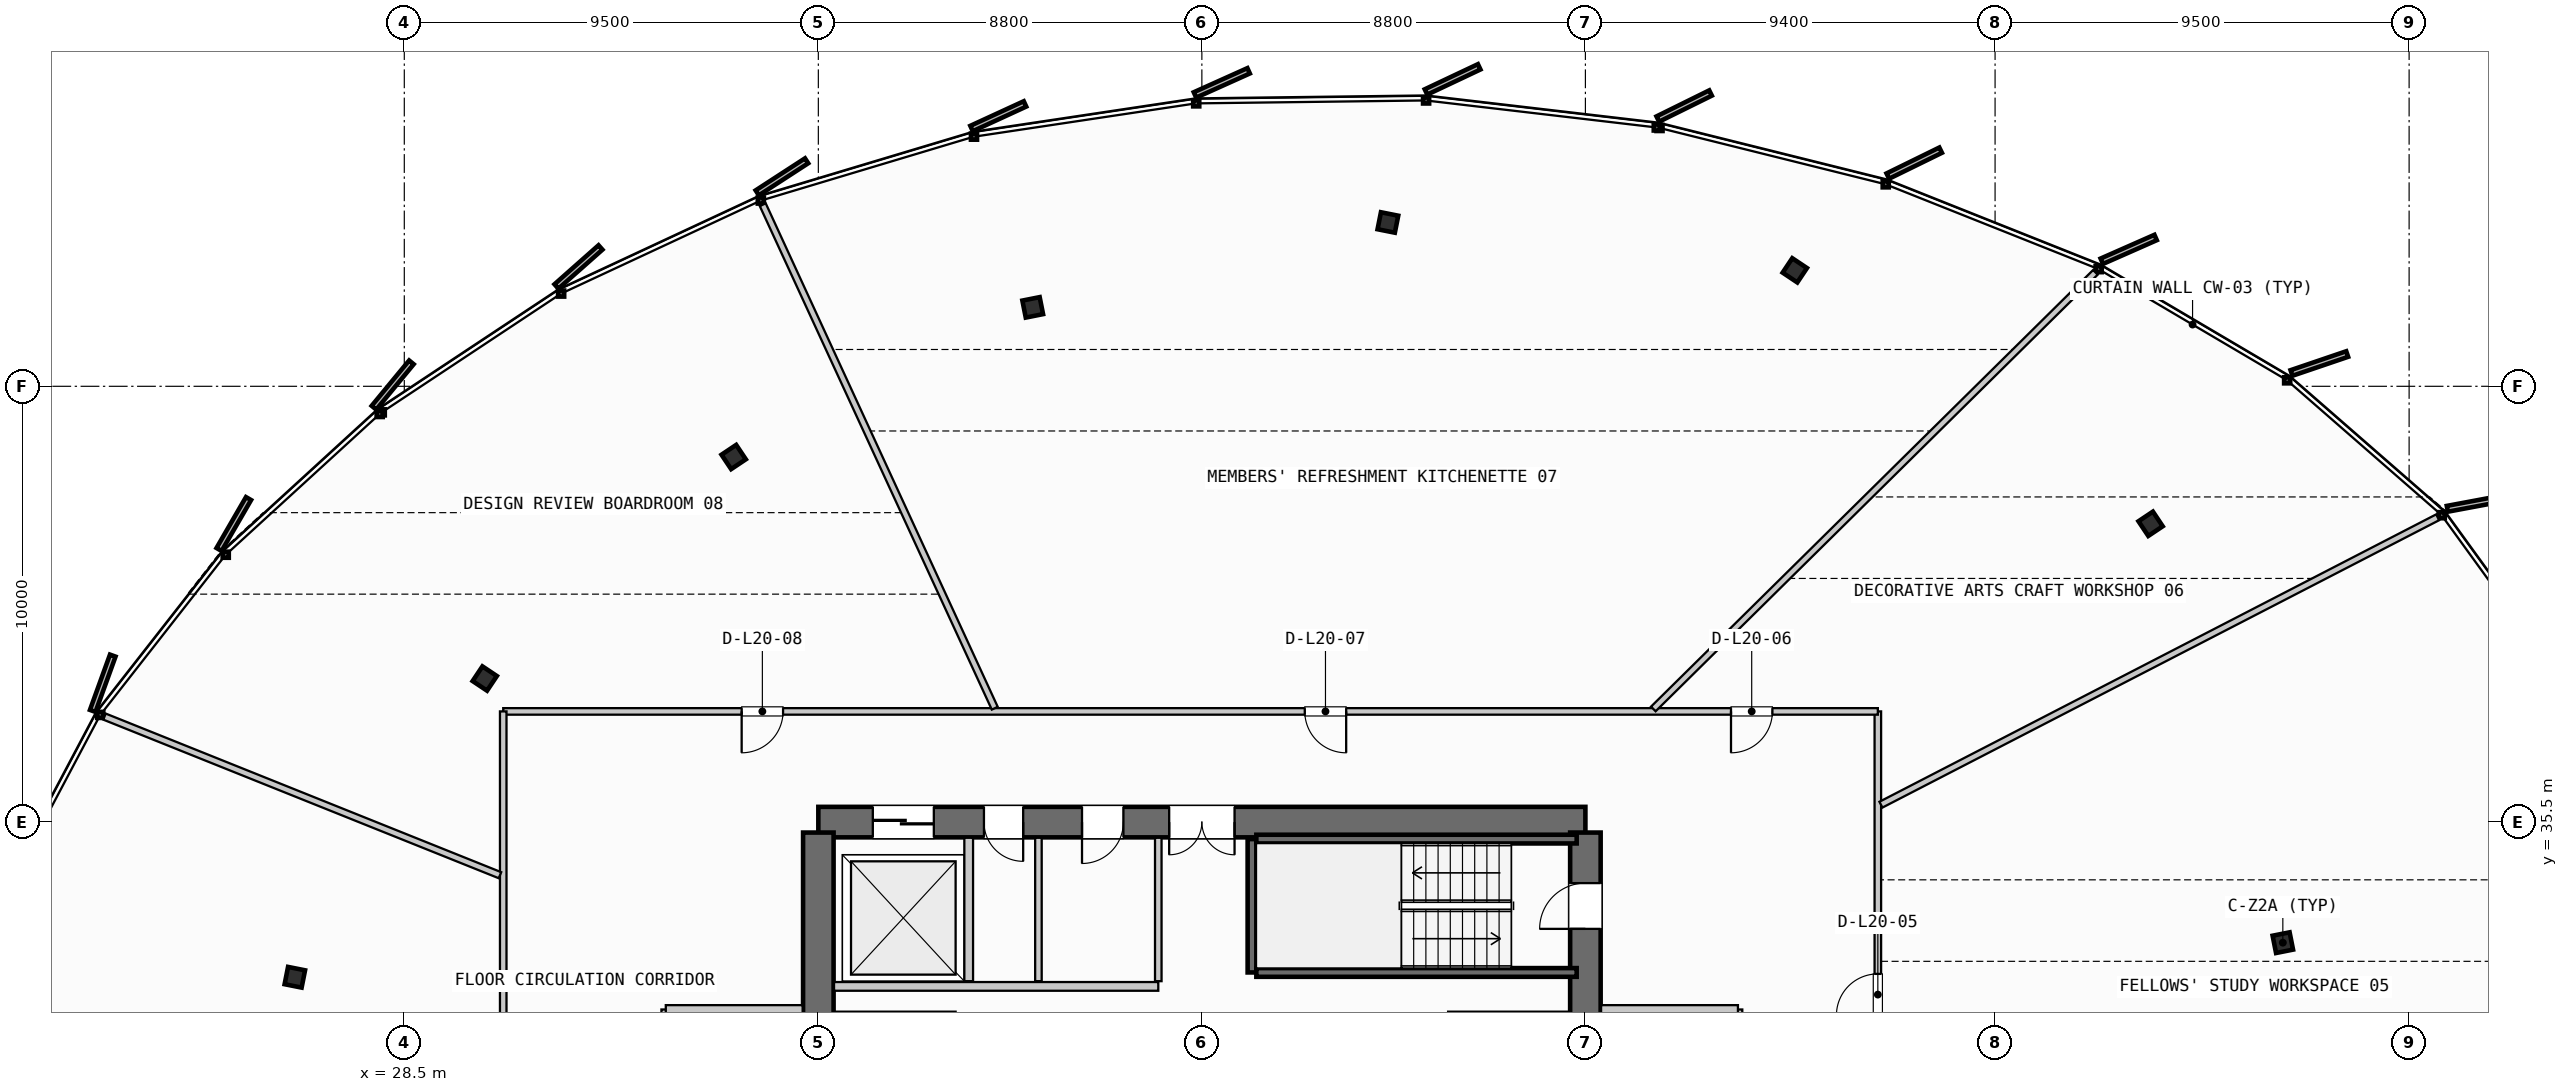
"""IFC4 building model, lengths in metres.
Left out: names, types, materials, properties, quantities, classifications, styles, units other than length and angle.
Written with IfcOpenShell. Run it as: python <this file> out.ifc"""

import sys

from ifc_helpers import new_model, si_unit, direction, frame, frame_2d, origin, origin_2d, place, context, subcontext, project, spatial, rectangle, i_section, extrude, source, transform, mapped, element, fill, save


model = new_model("IFC4")
c1 = context("Model", 3, precision=1e-05, world=origin(), true_north=direction((0.0, 1.0)))
c2 = subcontext(c1, "Body", "Model", "MODEL_VIEW")
j1 = project(units=[si_unit("LENGTHUNIT", "METRE"), si_unit("PLANEANGLEUNIT", "RADIAN")], contexts=[c1])
p1 = place(None, origin())
s1 = spatial("IfcSite", under=j1, at=p1, CompositionType="ELEMENT")
p2 = place(p1, origin())
s2 = spatial("IfcBuilding", under=s1, at=p2, CompositionType="ELEMENT")
p3 = place(p2, frame((0.0, 0.0, 85.6)))
s3 = spatial("IfcBuildingStorey", under=s2, at=p3, CompositionType="ELEMENT", Elevation=85.6)
p4 = place(p3, frame((55.6, 35.5, 0.0), z_axis=(0.0, 0.0, 1.0), x_axis=(-1.0, 0.0, 0.0)))
e1 = element("IfcWall", 1, at=p4, inside=s3, PredefinedType="SHEAR", context=c2, shape_type="SweptSolid", body=[
    extrude(rectangle(XDim=17.6, YDim=0.7, at=frame_2d((8.8, 0.0))), origin(), (0.0, 0.0, 1.0), 3.35),
])
p5 = place(p4, frame((8.05, 0.0, 0.0)))
e2 = element("IfcOpeningElement", 2, at=p5, cuts=e1, PredefinedType="OPENING", context=c2, shape_type="SweptSolid", body=[
    extrude(rectangle(XDim=1.5, YDim=2.2, at=frame_2d((0.75, 1.1))), frame((0.0, 0.36, 0.0), z_axis=(0.0, -1.0, 0.0), x_axis=(1.0, 0.0, 0.0)), (0.0, 0.0, 1.0), 0.72),
])
p6 = place(p4, frame((14.95, 0.0, 0.0)))
e3 = element("IfcOpeningElement", 3, at=p6, cuts=e1, PredefinedType="OPENING", context=c2, shape_type="SweptSolid", body=[
    extrude(rectangle(XDim=1.4, YDim=2.3, at=frame_2d((0.7, 1.15))), frame((0.0, 0.36, 0.0), z_axis=(0.0, -1.0, 0.0), x_axis=(1.0, 0.0, 0.0)), (0.0, 0.0, 1.0), 0.72),
])
p7 = place(p4, frame((12.9, 0.0, 0.0)))
e4 = element("IfcOpeningElement", 4, at=p7, cuts=e1, PredefinedType="OPENING", context=c2, shape_type="SweptSolid", body=[
    extrude(rectangle(XDim=0.9, YDim=2.15, at=frame_2d((0.45, 1.075))), frame((0.0, 0.36, 0.0), z_axis=(0.0, -1.0, 0.0), x_axis=(1.0, 0.0, 0.0)), (0.0, 0.0, 1.0), 0.72),
])
p8 = place(p4, frame((10.6, 0.0, 0.0)))
e5 = element("IfcOpeningElement", 5, at=p8, cuts=e1, PredefinedType="OPENING", context=c2, shape_type="SweptSolid", body=[
    extrude(rectangle(XDim=0.95, YDim=2.15, at=frame_2d((0.475, 1.075))), frame((0.0, 0.36, 0.0), z_axis=(0.0, -1.0, 0.0), x_axis=(1.0, 0.0, 0.0)), (0.0, 0.0, 1.0), 0.72),
])
p9 = place(p3, frame((38.0, 35.26, 0.0), z_axis=(0.0, 0.0, 1.0), x_axis=(0.0, -1.0, 0.0)))
e6 = element("IfcWall", 6, at=p9, inside=s3, PredefinedType="SHEAR", context=c2, shape_type="SweptSolid", body=[
    extrude(rectangle(XDim=14.92, YDim=0.7, at=frame_2d((7.46, 0.0))), origin(), (0.0, 0.0, 1.0), 3.35),
])
p10 = place(p9, frame((5.21, 0.0, 0.0)))
e7 = element("IfcOpeningElement", 7, at=p10, cuts=e6, PredefinedType="OPENING", context=c2, shape_type="SweptSolid", body=[
    extrude(rectangle(XDim=1.1, YDim=2.2, at=frame_2d((0.55, 1.1))), frame((0.0, 0.36, 0.0), z_axis=(0.0, -1.0, 0.0), x_axis=(1.0, 0.0, 0.0)), (0.0, 0.0, 1.0), 0.72),
])
p11 = place(p3, frame((55.6, 20.34, 0.0), z_axis=(0.0, 0.0, 1.0), x_axis=(0.0, 1.0, 0.0)))
e8 = element("IfcWall", 8, at=p11, inside=s3, PredefinedType="SHEAR", context=c2, shape_type="SweptSolid", body=[
    extrude(rectangle(XDim=14.92, YDim=0.7, at=frame_2d((7.46, 0.0))), origin(), (0.0, 0.0, 1.0), 3.35),
])
p12 = place(p11, frame((12.71, 0.0, 0.0)))
e9 = element("IfcOpeningElement", 9, at=p12, cuts=e8, PredefinedType="OPENING", context=c2, shape_type="SweptSolid", body=[
    extrude(rectangle(XDim=1.05, YDim=2.15, at=frame_2d((0.525, 1.075))), frame((0.0, 0.36, 0.0), z_axis=(0.0, -1.0, 0.0), x_axis=(1.0, 0.0, 0.0)), (0.0, 0.0, 1.0), 0.72),
])
p13 = place(p11, frame((8.61, 0.0, 0.0)))
e10 = element("IfcOpeningElement", 10, at=p13, cuts=e8, PredefinedType="OPENING", context=c2, shape_type="SweptSolid", body=[
    extrude(rectangle(XDim=1.1, YDim=2.2, at=frame_2d((0.55, 1.1))), frame((0.0, 0.36, 0.0), z_axis=(0.0, -1.0, 0.0), x_axis=(1.0, 0.0, 0.0)), (0.0, 0.0, 1.0), 0.72),
])
m1 = source(origin(), c2, "Body", "SweptSolid", [
    extrude(i_section(OverallWidth=0.405, OverallDepth=0.398, WebThickness=0.035, FlangeThickness=0.056, FilletRadius=0.015, at=origin_2d()), origin(), (0.0, 0.0, 1.0), 3.35),
])
for number, where, z_axis, x_axis in (
    (11, (71.603, 32.733, 0.0), (0.0, 0.0, 1.0), (0.981, 0.195, 0.0)),
    (12, (68.569, 42.345, 0.0), (0.0, 0.0, 1.0), (0.831, 0.556, 0.0)),
    (13, (60.405, 48.161, 0.0), (0.0, 0.0, 1.0), (0.556, 0.831, 0.0)),
    (14, (51.069, 49.259, 0.0), (0.0, 0.0, 1.0), (0.195, 0.981, 0.0)),
    (15, (42.919, 47.311, 0.0), (0.0, 0.0, 1.0), (-0.195, 0.981, 0.0)),
    (16, (36.058, 43.877, 0.0), (0.0, 0.0, 1.0), (-0.556, 0.831, 0.0)),
    (17, (30.346, 38.794, 0.0), (0.0, 0.0, 1.0), (-0.831, 0.556, 0.0)),
    (18, (25.989, 31.94, 0.0), (0.0, 0.0, 1.0), (-0.981, 0.195, 0.0)),
):
    element("IfcColumn", number, at=place(p3, frame(where, z_axis=z_axis, x_axis=x_axis)), inside=s3, PredefinedType="COLUMN", context=c2, shape_type="MappedRepresentation", body=[
        mapped(m1, transform((0.0, 0.0, 0.0), scale=1.0)),
    ])
p14 = place(p3, frame((47.95, 32.05, 0.0), z_axis=(0.0, 0.0, 1.0), x_axis=(0.0, 1.0, 0.0)))
e19 = element("IfcWall", 19, at=p14, inside=s3, PredefinedType="SHEAR", context=c2, shape_type="SweptSolid", body=[
    extrude(rectangle(XDim=3.06, YDim=0.2, at=frame_2d((1.53, 0.0))), origin(), (0.0, 0.0, 1.0), 3.35),
])
for number, where, z_axis, x_axis in (
    (20, (48.05, 35.11, 0.0), (0.0, 0.0, 1.0), (1.0, 0.0, 0.0)),
    (21, (55.4, 32.05, 0.0), (0.0, 0.0, 1.0), (-1.0, 0.0, 0.0)),
):
    element("IfcWall", number, at=place(p3, frame(where, z_axis=z_axis, x_axis=x_axis)), inside=s3, PredefinedType="SHEAR", context=c2, shape_type="SweptSolid", body=[
        extrude(rectangle(XDim=7.35, YDim=0.2, at=frame_2d((3.675, 0.0))), origin(), (0.0, 0.0, 1.0), 3.35),
    ])
p15 = place(p3, frame((38.36, 31.05, 0.0), z_axis=(0.0, 0.0, 1.0), x_axis=(1.0, 0.0, 0.0)))
e22 = element("IfcWall", 22, at=p15, inside=s3, PredefinedType="PARTITIONING", context=c2, shape_type="SweptSolid", body=[
    extrude(rectangle(XDim=2.79, YDim=0.2, at=frame_2d((1.395, 0.0))), origin(), (0.0, 0.0, 1.0), 2.28),
])
p16 = place(p3, frame((34.5, 31.2, 0.0), z_axis=(0.0, 0.0, 1.0), x_axis=(0.0, -1.0, 0.0)))
e23 = element("IfcWall", 23, at=p16, inside=s3, PredefinedType="PARTITIONING", context=c2, shape_type="SweptSolid", body=[
    extrude(rectangle(XDim=4.4, YDim=0.2, at=frame_2d((2.2, 0.0))), origin(), (0.0, 0.0, 1.0), 2.28),
])
p17 = place(p16, frame((1.65, 0.0, 0.0)))
e24 = element("IfcOpeningElement", 24, at=p17, cuts=e23, PredefinedType="OPENING", context=c2, shape_type="SweptSolid", body=[
    extrude(rectangle(XDim=1.05, YDim=2.15, at=frame_2d((0.525, 1.075))), frame((0.0, 0.11, 0.0), z_axis=(0.0, -1.0, 0.0), x_axis=(1.0, 0.0, 0.0)), (0.0, 0.0, 1.0), 0.22),
])
p18 = place(p3, frame((34.5, 31.2, 0.0), z_axis=(0.0, 0.0, 1.0), x_axis=(1.0, 0.0, 0.0)))
e25 = element("IfcWall", 25, at=p18, inside=s3, PredefinedType="PARTITIONING", context=c2, shape_type="SweptSolid", body=[
    extrude(rectangle(XDim=3.14, YDim=0.2, at=frame_2d((1.57, 0.0))), origin(), (0.0, 0.0, 1.0), 2.28),
])
p19 = place(p3, frame((52.45, 31.05, 0.0), z_axis=(0.0, 0.0, 1.0), x_axis=(1.0, 0.0, 0.0)))
e26 = element("IfcWall", 26, at=p19, inside=s3, PredefinedType="PARTITIONING", context=c2, shape_type="SweptSolid", body=[
    extrude(rectangle(XDim=2.79, YDim=0.2, at=frame_2d((1.395, 0.0))), origin(), (0.0, 0.0, 1.0), 2.28),
])
p20 = place(p3, frame((59.1, 26.8, 0.0), z_axis=(0.0, 0.0, 1.0), x_axis=(0.0, 1.0, 0.0)))
e27 = element("IfcWall", 27, at=p20, inside=s3, PredefinedType="PARTITIONING", context=c2, shape_type="SweptSolid", body=[
    extrude(rectangle(XDim=4.4, YDim=0.2, at=frame_2d((2.2, 0.0))), origin(), (0.0, 0.0, 1.0), 2.28),
])
p21 = place(p20, frame((1.65, 0.0, 0.0)))
e28 = element("IfcOpeningElement", 28, at=p21, cuts=e27, PredefinedType="OPENING", context=c2, shape_type="SweptSolid", body=[
    extrude(rectangle(XDim=1.05, YDim=2.15, at=frame_2d((0.525, 1.075))), frame((0.0, 0.11, 0.0), z_axis=(0.0, -1.0, 0.0), x_axis=(1.0, 0.0, 0.0)), (0.0, 0.0, 1.0), 0.22),
])
p22 = place(p3, frame((55.96, 31.2, 0.0), z_axis=(0.0, 0.0, 1.0), x_axis=(1.0, 0.0, 0.0)))
e29 = element("IfcWall", 29, at=p22, inside=s3, PredefinedType="PARTITIONING", context=c2, shape_type="SweptSolid", body=[
    extrude(rectangle(XDim=3.14, YDim=0.2, at=frame_2d((1.57, 0.0))), origin(), (0.0, 0.0, 1.0), 2.28),
])
p23 = place(p3, frame((41.45, 31.85, 0.0), z_axis=(0.0, 0.0, 1.0), x_axis=(0.0, 1.0, 0.0)))
e30 = element("IfcWall", 30, at=p23, inside=s3, PredefinedType="PARTITIONING", context=c2, shape_type="SweptSolid", body=[
    extrude(rectangle(XDim=3.29, YDim=0.2, at=frame_2d((1.645, 0.0))), origin(), (0.0, 0.0, 1.0), 2.28),
])
p24 = place(p3, frame((38.36, 31.73, 0.0), z_axis=(0.0, 0.0, 1.0), x_axis=(1.0, 0.0, 0.0)))
e31 = element("IfcWall", 31, at=p24, inside=s3, PredefinedType="PARTITIONING", context=c2, shape_type="SweptSolid", body=[
    extrude(rectangle(XDim=7.44, YDim=0.2, at=frame_2d((3.72, 0.0))), origin(), (0.0, 0.0, 1.0), 2.28),
])
p25 = place(p3, frame((45.8, 31.85, 0.0), z_axis=(0.0, 0.0, 1.0), x_axis=(0.0, 1.0, 0.0)))
e32 = element("IfcWall", 32, at=p25, inside=s3, PredefinedType="PARTITIONING", context=c2, shape_type="SweptSolid", body=[
    extrude(rectangle(XDim=3.29, YDim=0.15, at=frame_2d((1.645, 0.0))), origin(), (0.0, 0.0, 1.0), 2.28),
])
p26 = place(p3, frame((43.05, 31.85, 0.0), z_axis=(0.0, 0.0, 1.0), x_axis=(0.0, 1.0, 0.0)))
e33 = element("IfcWall", 33, at=p26, inside=s3, PredefinedType="PLUMBINGWALL", context=c2, shape_type="SweptSolid", body=[
    extrude(rectangle(XDim=3.29, YDim=0.15, at=frame_2d((1.645, 0.0))), origin(), (0.0, 0.0, 1.0), 2.28),
])
p27 = place(p3, frame((62.31, 17.98, 0.0), z_axis=(0.0, 0.0, 1.0), x_axis=(0.0, 1.0, 0.0)))
e34 = element("IfcWall", 34, at=p27, inside=s3, PredefinedType="PARTITIONING", context=c2, shape_type="SweptSolid", body=[
    extrude(rectangle(XDim=20.06, YDim=0.15, at=frame_2d((10.03, 0.0))), origin(), (0.0, 0.0, 1.0), 2.28),
])
p28 = place(p27, frame((4.576, 0.0, 0.0)))
e35 = element("IfcOpeningElement", 35, at=p28, cuts=e34, PredefinedType="OPENING", context=c2, shape_type="SweptSolid", body=[
    extrude(rectangle(XDim=0.95, YDim=2.15, at=frame_2d((0.475, 1.075))), frame((0.0, 0.085, 0.0), z_axis=(0.0, -1.0, 0.0), x_axis=(1.0, 0.0, 0.0)), (0.0, 0.0, 1.0), 0.17),
])
p29 = place(p27, frame((13.087, 0.0, 0.0)))
e36 = element("IfcOpeningElement", 36, at=p29, cuts=e34, PredefinedType="OPENING", context=c2, shape_type="SweptSolid", body=[
    extrude(rectangle(XDim=0.95, YDim=2.15, at=frame_2d((0.475, 1.075))), frame((0.0, 0.085, 0.0), z_axis=(0.0, -1.0, 0.0), x_axis=(1.0, 0.0, 0.0)), (0.0, 0.0, 1.0), 0.17),
])
p30 = place(p3, frame((62.31, 38.04, 0.0), z_axis=(0.0, 0.0, 1.0), x_axis=(-1.0, 0.0, 0.0)))
e37 = element("IfcWall", 37, at=p30, inside=s3, PredefinedType="PARTITIONING", context=c2, shape_type="SweptSolid", body=[
    extrude(rectangle(XDim=31.54, YDim=0.15, at=frame_2d((15.77, 0.0))), origin(), (0.0, 0.0, 1.0), 2.28),
])
p31 = place(p30, frame((2.419, 0.0, 0.0)))
e38 = element("IfcOpeningElement", 38, at=p31, cuts=e37, PredefinedType="OPENING", context=c2, shape_type="SweptSolid", body=[
    extrude(rectangle(XDim=0.95, YDim=2.15, at=frame_2d((0.475, 1.075))), frame((0.0, 0.085, 0.0), z_axis=(0.0, -1.0, 0.0), x_axis=(1.0, 0.0, 0.0)), (0.0, 0.0, 1.0), 0.17),
])
p32 = place(p30, frame((12.199, 0.0, 0.0)))
e39 = element("IfcOpeningElement", 39, at=p32, cuts=e37, PredefinedType="OPENING", context=c2, shape_type="SweptSolid", body=[
    extrude(rectangle(XDim=0.95, YDim=2.15, at=frame_2d((0.475, 1.075))), frame((0.0, 0.085, 0.0), z_axis=(0.0, -1.0, 0.0), x_axis=(1.0, 0.0, 0.0)), (0.0, 0.0, 1.0), 0.17),
])
p33 = place(p30, frame((25.119, 0.0, 0.0)))
e40 = element("IfcOpeningElement", 40, at=p33, cuts=e37, PredefinedType="OPENING", context=c2, shape_type="SweptSolid", body=[
    extrude(rectangle(XDim=0.95, YDim=2.15, at=frame_2d((0.475, 1.075))), frame((0.0, 0.085, 0.0), z_axis=(0.0, -1.0, 0.0), x_axis=(1.0, 0.0, 0.0)), (0.0, 0.0, 1.0), 0.17),
])
p34 = place(p3, frame((30.77, 38.04, 0.0), z_axis=(0.0, 0.0, 1.0), x_axis=(0.0, -1.0, 0.0)))
e41 = element("IfcWall", 41, at=p34, inside=s3, PredefinedType="PARTITIONING", context=c2, shape_type="SweptSolid", body=[
    extrude(rectangle(XDim=20.06, YDim=0.15, at=frame_2d((10.03, 0.0))), origin(), (0.0, 0.0, 1.0), 2.28),
])
p35 = place(p34, frame((11.031, 0.0, 0.0)))
e42 = element("IfcOpeningElement", 42, at=p35, cuts=e41, PredefinedType="OPENING", context=c2, shape_type="SweptSolid", body=[
    extrude(rectangle(XDim=0.95, YDim=2.15, at=frame_2d((0.475, 1.075))), frame((0.0, 0.085, 0.0), z_axis=(0.0, -1.0, 0.0), x_axis=(1.0, 0.0, 0.0)), (0.0, 0.0, 1.0), 0.17),
])
p36 = place(p3, frame((62.381, 35.9, 0.0), z_axis=(0.0, 0.0, 1.0), x_axis=(0.888592298941, 0.458697859449, 0.0)))
e43 = element("IfcWall", 43, at=p36, inside=s3, PredefinedType="PARTITIONING", context=c2, shape_type="SweptSolid", body=[
    extrude(rectangle(XDim=14.375, YDim=0.15, at=frame_2d((7.188, 0.0))), origin(), (0.0, 0.0, 1.0), 2.28),
])
p37 = place(p3, frame((57.159, 38.096, 0.0), z_axis=(0.0, 0.0, 1.0), x_axis=(0.711460184379, 0.702726409098, 0.0)))
e44 = element("IfcWall", 44, at=p37, inside=s3, PredefinedType="PARTITIONING", context=c2, shape_type="SweptSolid", body=[
    extrude(rectangle(XDim=14.256, YDim=0.15, at=frame_2d((7.128, 0.0))), origin(), (0.0, 0.0, 1.0), 2.28),
])
p38 = place(p3, frame((42.048, 38.113, 0.0), z_axis=(0.0, 0.0, 1.0), x_axis=(-0.418444712676, 0.908242270781, 0.0)))
e45 = element("IfcWall", 45, at=p38, inside=s3, PredefinedType="PARTITIONING", context=c2, shape_type="SweptSolid", body=[
    extrude(rectangle(XDim=12.721, YDim=0.15, at=frame_2d((6.361, 0.0))), origin(), (0.0, 0.0, 1.0), 2.28),
])
p39 = place(p3, frame((30.696, 34.281, 0.0), z_axis=(0.0, 0.0, 1.0), x_axis=(-0.92813187897, 0.372251548337, 0.0)))
e46 = element("IfcWall", 46, at=p39, inside=s3, PredefinedType="PARTITIONING", context=c2, shape_type="SweptSolid", body=[
    extrude(rectangle(XDim=9.777, YDim=0.15, at=frame_2d((4.889, 0.0))), origin(), (0.0, 0.0, 1.0), 2.28),
])
m2 = source(origin(), c2, "Body", "SweptSolid", [
    extrude(rectangle(XDim=1.05, YDim=2.15, at=frame_2d((0.525, 1.075))), frame((0.0, 0.025, 0.0), z_axis=(0.0, -1.0, 0.0), x_axis=(1.0, 0.0, 0.0)), (0.0, 0.0, 1.0), 0.05),
])
p40 = place(p12, origin())
e47 = element("IfcDoor", 47, at=p40, inside=s3, OperationType="SINGLE_SWING_LEFT", PredefinedType="DOOR", context=c2, shape_type="MappedRepresentation", body=[
    mapped(m2, transform((0.0, 0.0, 0.0), scale=1.0)),
])
fill(e9, e47)
m3 = source(origin(), c2, "Body", "SweptSolid", [
    extrude(rectangle(XDim=1.5, YDim=2.2, at=frame_2d((0.75, 1.1))), frame((0.0, 0.025, 0.0), z_axis=(0.0, -1.0, 0.0), x_axis=(1.0, 0.0, 0.0)), (0.0, 0.0, 1.0), 0.05),
])
p41 = place(p5, origin())
e48 = element("IfcDoor", 48, at=p41, inside=s3, OperationType="DOUBLE_DOOR_SINGLE_SWING", PredefinedType="DOOR", context=c2, shape_type="MappedRepresentation", body=[
    mapped(m3, transform((0.0, 0.0, 0.0), scale=1.0)),
])
fill(e2, e48)
m4 = source(origin(), c2, "Body", "SweptSolid", [
    extrude(rectangle(XDim=1.4, YDim=2.3, at=frame_2d((0.7, 1.15))), frame((0.0, 0.025, 0.0), z_axis=(0.0, -1.0, 0.0), x_axis=(1.0, 0.0, 0.0)), (0.0, 0.0, 1.0), 0.05),
])
p42 = place(p6, origin())
e49 = element("IfcDoor", 49, at=p42, inside=s3, OperationType="SLIDING_TO_RIGHT", PredefinedType="DOOR", context=c2, shape_type="MappedRepresentation", body=[
    mapped(m4, transform((0.0, 0.0, 0.0), scale=1.0)),
])
fill(e3, e49)
m5 = source(origin(), c2, "Body", "SweptSolid", [
    extrude(rectangle(XDim=0.9, YDim=2.15, at=frame_2d((0.45, 1.075))), frame((0.0, 0.025, 0.0), z_axis=(0.0, -1.0, 0.0), x_axis=(1.0, 0.0, 0.0)), (0.0, 0.0, 1.0), 0.05),
])
p43 = place(p7, origin())
e50 = element("IfcDoor", 50, at=p43, inside=s3, OperationType="SINGLE_SWING_LEFT", PredefinedType="DOOR", context=c2, shape_type="MappedRepresentation", body=[
    mapped(m5, transform((0.0, 0.0, 0.0), scale=1.0)),
])
fill(e4, e50)
m6 = source(origin(), c2, "Body", "SweptSolid", [
    extrude(rectangle(XDim=0.95, YDim=2.15, at=frame_2d((0.475, 1.075))), frame((0.0, 0.025, 0.0), z_axis=(0.0, -1.0, 0.0), x_axis=(1.0, 0.0, 0.0)), (0.0, 0.0, 1.0), 0.05),
])
p44 = place(p8, origin())
e51 = element("IfcDoor", 51, at=p44, inside=s3, OperationType="SINGLE_SWING_RIGHT", PredefinedType="DOOR", context=c2, shape_type="MappedRepresentation", body=[
    mapped(m6, transform((0.0, 0.0, 0.0), scale=1.0)),
])
fill(e5, e51)
p45 = place(p29, origin())
e52 = element("IfcDoor", 52, at=p45, inside=s3, OperationType="SINGLE_SWING_LEFT", PredefinedType="DOOR", context=c2, shape_type="MappedRepresentation", body=[
    mapped(m6, transform((0.0, 0.0, 0.0), scale=1.0)),
])
fill(e36, e52)
p46 = place(p31, origin())
e53 = element("IfcDoor", 53, at=p46, inside=s3, OperationType="SINGLE_SWING_RIGHT", PredefinedType="DOOR", context=c2, shape_type="MappedRepresentation", body=[
    mapped(m6, transform((0.0, 0.0, 0.0), scale=1.0)),
])
fill(e38, e53)
p47 = place(p32, origin())
e54 = element("IfcDoor", 54, at=p47, inside=s3, OperationType="SINGLE_SWING_LEFT", PredefinedType="DOOR", context=c2, shape_type="MappedRepresentation", body=[
    mapped(m6, transform((0.0, 0.0, 0.0), scale=1.0)),
])
fill(e39, e54)
p48 = place(p33, origin())
e55 = element("IfcDoor", 55, at=p48, inside=s3, OperationType="SINGLE_SWING_RIGHT", PredefinedType="DOOR", context=c2, shape_type="MappedRepresentation", body=[
    mapped(m6, transform((0.0, 0.0, 0.0), scale=1.0)),
])
fill(e40, e55)
save(model, sys.argv[1])
